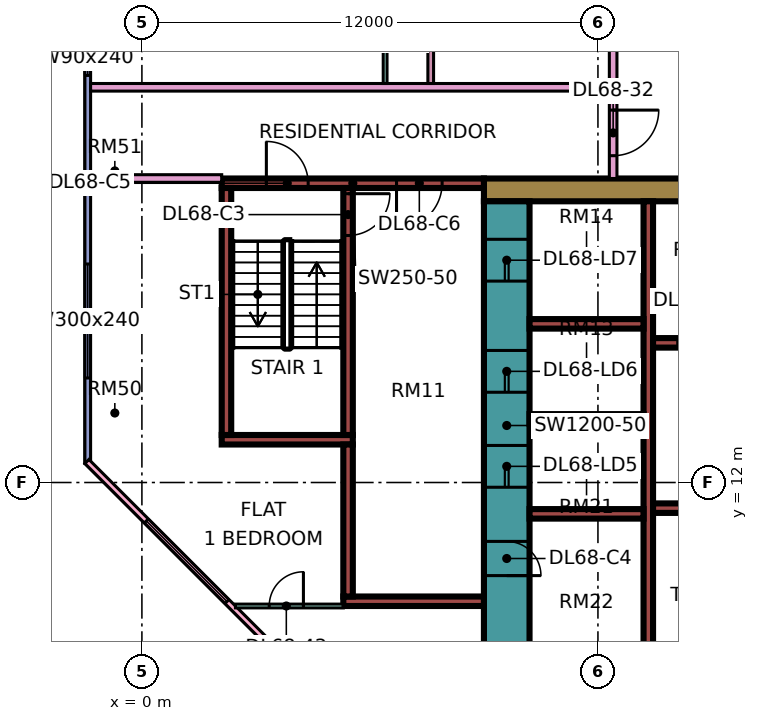
"""IFC4 building model, lengths in metres.
Left out: names, types, materials, properties, quantities, classifications, styles, units other than length and angle.
Written with IfcOpenShell. Run it as: python <this file> out.ifc"""

import sys

from ifc_helpers import new_model, si_unit, direction, frame, frame_2d, origin, place, context, subcontext, project, spatial, rectangle, extrude, element, fill, save


model = new_model("IFC4")
c1 = context("Model", 3, precision=1e-05, world=origin(), true_north=direction((0.0, 1.0)))
c2 = subcontext(c1, "Body", "Model", "MODEL_VIEW")
j1 = project(units=[si_unit("LENGTHUNIT", "METRE"), si_unit("PLANEANGLEUNIT", "RADIAN")], contexts=[c1])
p1 = place(None, origin())
s1 = spatial("IfcSite", under=j1, at=p1, CompositionType="ELEMENT")
p2 = place(p1, origin())
s2 = spatial("IfcBuilding", under=s1, at=p2, CompositionType="ELEMENT")
p3 = place(p2, frame((0.0, 0.0, 292.15)))
s3 = spatial("IfcBuildingStorey", under=s2, at=p3, CompositionType="ELEMENT", Elevation=292.15)
p4 = place(p3, frame((9.0, 19.7, 0.0), z_axis=(0.0, 0.0, 1.0), x_axis=(1.0, 0.0, 0.0)))
e1 = element("IfcWall", 1, at=p4, inside=s3, PredefinedType="SHEAR", context=c2, shape_type="SweptSolid", body=[
    extrude(rectangle(XDim=25.0, YDim=0.6, at=frame_2d((12.5, 0.0))), origin(), (0.0, 0.0, 1.0), 3.75),
])
p5 = place(p4, frame((19.1, 0.0, 0.0)))
e2 = element("IfcOpeningElement", 2, at=p5, cuts=e1, PredefinedType="OPENING", context=c2, shape_type="SweptSolid", body=[
    extrude(rectangle(XDim=1.8, YDim=2.4, at=frame_2d((0.9, 1.2))), frame((0.0, 0.31, 0.0), z_axis=(0.0, -1.0, 0.0), x_axis=(1.0, 0.0, 0.0)), (0.0, 0.0, 1.0), 0.62),
])
p6 = place(p3, frame((9.6, 7.6, 0.0), z_axis=(0.0, 0.0, 1.0), x_axis=(0.0, 1.0, 0.0)))
e3 = element("IfcWall", 3, at=p6, inside=s3, PredefinedType="SHEAR", context=c2, shape_type="SweptSolid", body=[
    extrude(rectangle(XDim=11.8, YDim=1.2, at=frame_2d((5.9, 0.0))), origin(), (0.0, 0.0, 1.0), 3.75),
])
p7 = place(p6, frame((4.275, 0.0, 0.0)))
e4 = element("IfcOpeningElement", 4, at=p7, cuts=e3, PredefinedType="OPENING", context=c2, shape_type="SweptSolid", body=[
    extrude(rectangle(XDim=1.1, YDim=2.2, at=frame_2d((0.55, 1.1))), frame((0.0, 0.61, 0.0), z_axis=(0.0, -1.0, 0.0), x_axis=(1.0, 0.0, 0.0)), (0.0, 0.0, 1.0), 1.22),
])
p8 = place(p6, frame((6.775, 0.0, 0.0)))
e5 = element("IfcOpeningElement", 5, at=p8, cuts=e3, PredefinedType="OPENING", context=c2, shape_type="SweptSolid", body=[
    extrude(rectangle(XDim=1.1, YDim=2.2, at=frame_2d((0.55, 1.1))), frame((0.0, 0.61, 0.0), z_axis=(0.0, -1.0, 0.0), x_axis=(1.0, 0.0, 0.0)), (0.0, 0.0, 1.0), 1.22),
])
p9 = place(p6, frame((9.7, 0.0, 0.0)))
e6 = element("IfcOpeningElement", 6, at=p9, cuts=e3, PredefinedType="OPENING", context=c2, shape_type="SweptSolid", body=[
    extrude(rectangle(XDim=1.1, YDim=2.2, at=frame_2d((0.55, 1.1))), frame((0.0, 0.61, 0.0), z_axis=(0.0, -1.0, 0.0), x_axis=(1.0, 0.0, 0.0)), (0.0, 0.0, 1.0), 1.22),
])
p10 = place(p6, frame((1.95, 0.0, 0.0)))
e7 = element("IfcOpeningElement", 7, at=p10, cuts=e3, PredefinedType="OPENING", context=c2, shape_type="SweptSolid", body=[
    extrude(rectangle(XDim=0.9, YDim=2.1, at=frame_2d((0.45, 1.05))), frame((0.0, 0.61, 0.0), z_axis=(0.0, -1.0, 0.0), x_axis=(1.0, 0.0, 0.0)), (0.0, 0.0, 1.0), 1.22),
])
p11 = place(p3, frame((13.325, 7.6, 0.0), z_axis=(0.0, 0.0, 1.0), x_axis=(0.0, 1.0, 0.0)))
e8 = element("IfcWall", 8, at=p11, inside=s3, PredefinedType="SHEAR", context=c2, shape_type="SweptSolid", body=[
    extrude(rectangle(XDim=11.8, YDim=0.25, at=frame_2d((5.9, 0.0))), origin(), (0.0, 0.0, 1.0), 3.75),
])
p12 = place(p3, frame((13.45, 11.325, 0.0), z_axis=(0.0, 0.0, 1.0), x_axis=(1.0, 0.0, 0.0)))
e9 = element("IfcWall", 9, at=p12, inside=s3, PredefinedType="SHEAR", context=c2, shape_type="SweptSolid", body=[
    extrude(rectangle(XDim=19.95, YDim=0.25, at=frame_2d((9.975, 0.0))), origin(), (0.0, 0.0, 1.0), 3.75),
])
p13 = place(p12, frame((1.55, 0.0, 0.0)))
e10 = element("IfcOpeningElement", 10, at=p13, cuts=e9, PredefinedType="OPENING", context=c2, shape_type="SweptSolid", body=[
    extrude(rectangle(XDim=0.9, YDim=2.1, at=frame_2d((0.45, 1.05))), frame((0.0, 0.135, 0.0), z_axis=(0.0, -1.0, 0.0), x_axis=(1.0, 0.0, 0.0)), (0.0, 0.0, 1.0), 0.27),
])
p14 = place(p12, frame((5.05, 0.0, 0.0)))
e11 = element("IfcOpeningElement", 11, at=p14, cuts=e9, PredefinedType="OPENING", context=c2, shape_type="SweptSolid", body=[
    extrude(rectangle(XDim=0.9, YDim=2.1, at=frame_2d((0.45, 1.05))), frame((0.0, 0.135, 0.0), z_axis=(0.0, -1.0, 0.0), x_axis=(1.0, 0.0, 0.0)), (0.0, 0.0, 1.0), 0.27),
])
p15 = place(p12, frame((8.425, 0.0, 0.0)))
e12 = element("IfcOpeningElement", 12, at=p15, cuts=e9, PredefinedType="OPENING", context=c2, shape_type="SweptSolid", body=[
    extrude(rectangle(XDim=0.9, YDim=2.1, at=frame_2d((0.45, 1.05))), frame((0.0, 0.135, 0.0), z_axis=(0.0, -1.0, 0.0), x_axis=(1.0, 0.0, 0.0)), (0.0, 0.0, 1.0), 0.27),
])
p16 = place(p12, frame((15.025, 0.0, 0.0)))
e13 = element("IfcOpeningElement", 13, at=p16, cuts=e9, PredefinedType="OPENING", context=c2, shape_type="SweptSolid", body=[
    extrude(rectangle(XDim=0.9, YDim=2.1, at=frame_2d((0.45, 1.05))), frame((0.0, 0.135, 0.0), z_axis=(0.0, -1.0, 0.0), x_axis=(1.0, 0.0, 0.0)), (0.0, 0.0, 1.0), 0.27),
])
p17 = place(p3, frame((13.45, 15.675, 0.0), z_axis=(0.0, 0.0, 1.0), x_axis=(1.0, 0.0, 0.0)))
e14 = element("IfcWall", 14, at=p17, inside=s3, PredefinedType="SHEAR", context=c2, shape_type="SweptSolid", body=[
    extrude(rectangle(XDim=13.75, YDim=0.25, at=frame_2d((6.875, 0.0))), origin(), (0.0, 0.0, 1.0), 3.75),
])
p18 = place(p17, frame((0.65, 0.0, 0.0)))
e15 = element("IfcOpeningElement", 15, at=p18, cuts=e14, PredefinedType="OPENING", context=c2, shape_type="SweptSolid", body=[
    extrude(rectangle(XDim=1.2, YDim=2.2, at=frame_2d((0.6, 1.1))), frame((0.0, 0.135, 0.0), z_axis=(0.0, -1.0, 0.0), x_axis=(1.0, 0.0, 0.0)), (0.0, 0.0, 1.0), 0.27),
])
p19 = place(p17, frame((3.4, 0.0, 0.0)))
e16 = element("IfcOpeningElement", 16, at=p19, cuts=e14, PredefinedType="OPENING", context=c2, shape_type="SweptSolid", body=[
    extrude(rectangle(XDim=1.2, YDim=2.2, at=frame_2d((0.6, 1.1))), frame((0.0, 0.135, 0.0), z_axis=(0.0, -1.0, 0.0), x_axis=(1.0, 0.0, 0.0)), (0.0, 0.0, 1.0), 0.27),
])
p20 = place(p17, frame((6.15, 0.0, 0.0)))
e17 = element("IfcOpeningElement", 17, at=p20, cuts=e14, PredefinedType="OPENING", context=c2, shape_type="SweptSolid", body=[
    extrude(rectangle(XDim=1.2, YDim=2.2, at=frame_2d((0.6, 1.1))), frame((0.0, 0.135, 0.0), z_axis=(0.0, -1.0, 0.0), x_axis=(1.0, 0.0, 0.0)), (0.0, 0.0, 1.0), 0.27),
])
p21 = place(p17, frame((8.9, 0.0, 0.0)))
e18 = element("IfcOpeningElement", 18, at=p21, cuts=e14, PredefinedType="OPENING", context=c2, shape_type="SweptSolid", body=[
    extrude(rectangle(XDim=1.2, YDim=2.2, at=frame_2d((0.6, 1.1))), frame((0.0, 0.135, 0.0), z_axis=(0.0, -1.0, 0.0), x_axis=(1.0, 0.0, 0.0)), (0.0, 0.0, 1.0), 0.27),
])
p22 = place(p17, frame((11.8, 0.0, 0.0)))
e19 = element("IfcOpeningElement", 19, at=p22, cuts=e14, PredefinedType="OPENING", context=c2, shape_type="SweptSolid", body=[
    extrude(rectangle(XDim=0.9, YDim=2.1, at=frame_2d((0.45, 1.05))), frame((0.0, 0.135, 0.0), z_axis=(0.0, -1.0, 0.0), x_axis=(1.0, 0.0, 0.0)), (0.0, 0.0, 1.0), 0.27),
])
for number, where, z_axis, x_axis in (
    (20, (10.2, 11.175, 0.0), (0.0, 0.0, 1.0), (1.0, 0.0, 0.0)),
    (21, (10.2, 13.675, 0.0), (0.0, 0.0, 1.0), (1.0, 0.0, 0.0)),
    (22, (10.2, 16.175, 0.0), (0.0, 0.0, 1.0), (1.0, 0.0, 0.0)),
):
    element("IfcWall", number, at=place(p3, frame(where, z_axis=z_axis, x_axis=x_axis)), inside=s3, PredefinedType="SHEAR", context=c2, shape_type="SweptSolid", body=[
        extrude(rectangle(XDim=3.0, YDim=0.25, at=frame_2d((1.5, 0.0))), origin(), (0.0, 0.0, 1.0), 3.75),
    ])
p23 = place(p3, frame((2.1, 19.875, 0.0), z_axis=(0.0, 0.0, 1.0), x_axis=(1.0, 0.0, 0.0)))
e23 = element("IfcWall", 23, at=p23, inside=s3, PredefinedType="SHEAR", context=c2, shape_type="SweptSolid", body=[
    extrude(rectangle(XDim=6.9, YDim=0.25, at=frame_2d((3.45, 0.0))), origin(), (0.0, 0.0, 1.0), 3.75),
])
p24 = place(p23, frame((1.175, 0.0, 0.0)))
e24 = element("IfcOpeningElement", 24, at=p24, cuts=e23, PredefinedType="OPENING", context=c2, shape_type="SweptSolid", body=[
    extrude(rectangle(XDim=1.1, YDim=2.2, at=frame_2d((0.55, 1.1))), frame((0.0, 0.135, 0.0), z_axis=(0.0, -1.0, 0.0), x_axis=(1.0, 0.0, 0.0)), (0.0, 0.0, 1.0), 0.27),
])
p25 = place(p23, frame((4.6, 0.0, 0.0)))
e25 = element("IfcOpeningElement", 25, at=p25, cuts=e23, PredefinedType="OPENING", context=c2, shape_type="SweptSolid", body=[
    extrude(rectangle(XDim=1.2, YDim=2.2, at=frame_2d((0.6, 1.1))), frame((0.0, 0.135, 0.0), z_axis=(0.0, -1.0, 0.0), x_axis=(1.0, 0.0, 0.0)), (0.0, 0.0, 1.0), 0.27),
])
p26 = place(p3, frame((2.1, 13.125, 0.0), z_axis=(0.0, 0.0, 1.0), x_axis=(1.0, 0.0, 0.0)))
e26 = element("IfcWall", 26, at=p26, inside=s3, PredefinedType="SHEAR", context=c2, shape_type="SweptSolid", body=[
    extrude(rectangle(XDim=3.45, YDim=0.25, at=frame_2d((1.725, 0.0))), origin(), (0.0, 0.0, 1.0), 3.75),
])
p27 = place(p3, frame((2.225, 13.25, 0.0), z_axis=(0.0, 0.0, 1.0), x_axis=(0.0, 1.0, 0.0)))
e27 = element("IfcWall", 27, at=p27, inside=s3, PredefinedType="SHEAR", context=c2, shape_type="SweptSolid", body=[
    extrude(rectangle(XDim=6.5, YDim=0.25, at=frame_2d((3.25, 0.0))), origin(), (0.0, 0.0, 1.0), 3.75),
])
p28 = place(p3, frame((5.425, 13.25, 0.0), z_axis=(0.0, 0.0, 1.0), x_axis=(0.0, 1.0, 0.0)))
e28 = element("IfcWall", 28, at=p28, inside=s3, PredefinedType="SHEAR", context=c2, shape_type="SweptSolid", body=[
    extrude(rectangle(XDim=6.5, YDim=0.25, at=frame_2d((3.25, 0.0))), origin(), (0.0, 0.0, 1.0), 3.75),
])
p29 = place(p28, frame((5.25, 0.0, 0.0)))
e29 = element("IfcOpeningElement", 29, at=p29, cuts=e28, PredefinedType="OPENING", context=c2, shape_type="SweptSolid", body=[
    extrude(rectangle(XDim=1.1, YDim=2.2, at=frame_2d((0.55, 1.1))), frame((0.0, 0.135, 0.0), z_axis=(0.0, -1.0, 0.0), x_axis=(1.0, 0.0, 0.0)), (0.0, 0.0, 1.0), 0.27),
])
p30 = place(p3, frame((5.3, 8.875, 0.0), z_axis=(0.0, 0.0, 1.0), x_axis=(1.0, 0.0, 0.0)))
e30 = element("IfcWall", 30, at=p30, inside=s3, PredefinedType="SHEAR", context=c2, shape_type="SweptSolid", body=[
    extrude(rectangle(XDim=3.7, YDim=0.25, at=frame_2d((1.85, 0.0))), origin(), (0.0, 0.0, 1.0), 3.75),
])
p31 = place(p3, frame((5.425, 9.0, 0.0), z_axis=(0.0, 0.0, 1.0), x_axis=(0.0, 1.0, 0.0)))
e31 = element("IfcWall", 31, at=p31, inside=s3, PredefinedType="SHEAR", context=c2, shape_type="SweptSolid", body=[
    extrude(rectangle(XDim=4.0, YDim=0.25, at=frame_2d((2.0, 0.0))), origin(), (0.0, 0.0, 1.0), 3.75),
])
p32 = place(p3, frame((-1.425, 23.925, 0.0), z_axis=(0.0, 0.0, 1.0), x_axis=(0.0, -1.0, 0.0)))
e32 = element("IfcWall", 32, at=p32, inside=s3, PredefinedType="SOLIDWALL", context=c2, shape_type="SweptSolid", body=[
    extrude(rectangle(XDim=11.425, YDim=0.15, at=frame_2d((5.712, 0.0))), origin(), (0.0, 0.0, 1.0), 3.35),
])
p33 = place(p32, frame((0.312, 0.0, 0.45)))
e33 = element("IfcOpeningElement", 33, at=p33, cuts=e32, PredefinedType="OPENING", context=c2, shape_type="SweptSolid", body=[
    extrude(rectangle(XDim=0.9, YDim=2.4, at=frame_2d((0.45, 1.2))), frame((0.0, 0.085, 0.0), z_axis=(0.0, -1.0, 0.0), x_axis=(1.0, 0.0, 0.0)), (0.0, 0.0, 1.0), 0.17),
])
p34 = place(p32, frame((6.175, 0.0, 0.45)))
e34 = element("IfcOpeningElement", 34, at=p34, cuts=e32, PredefinedType="OPENING", context=c2, shape_type="SweptSolid", body=[
    extrude(rectangle(XDim=3.0, YDim=2.4, at=frame_2d((1.5, 1.2))), frame((0.0, 0.085, 0.0), z_axis=(0.0, -1.0, 0.0), x_axis=(1.0, 0.0, 0.0)), (0.0, 0.0, 1.0), 0.17),
])
p35 = place(p3, frame((-1.447, 12.553, 0.0), z_axis=(0.0, 0.0, 1.0), x_axis=(0.707106781187, -0.707106781187, 0.0)))
e35 = element("IfcWall", 35, at=p35, inside=s3, PredefinedType="SOLIDWALL", context=c2, shape_type="SweptSolid", body=[
    extrude(rectangle(XDim=19.799, YDim=0.15, at=frame_2d((9.899, 0.0))), origin(), (0.0, 0.0, 1.0), 3.35),
])
p36 = place(p35, frame((2.212, 0.0, 0.45)))
e36 = element("IfcOpeningElement", 36, at=p36, cuts=e35, PredefinedType="OPENING", context=c2, shape_type="SweptSolid", body=[
    extrude(rectangle(XDim=3.0, YDim=2.4, at=frame_2d((1.5, 1.2))), frame((0.0, 0.085, 0.0), z_axis=(0.0, -1.0, 0.0), x_axis=(1.0, 0.0, 0.0)), (0.0, 0.0, 1.0), 0.17),
])
p37 = place(p35, frame((10.216, 0.0, 0.45)))
e37 = element("IfcOpeningElement", 37, at=p37, cuts=e35, PredefinedType="OPENING", context=c2, shape_type="SweptSolid", body=[
    extrude(rectangle(XDim=3.0, YDim=2.4, at=frame_2d((1.5, 1.2))), frame((0.0, 0.085, 0.0), z_axis=(0.0, -1.0, 0.0), x_axis=(1.0, 0.0, 0.0)), (0.0, 0.0, 1.0), 0.17),
])
p38 = place(p3, frame((-1.35, 20.0, 0.0), z_axis=(0.0, 0.0, 1.0), x_axis=(1.0, 0.0, 0.0)))
e38 = element("IfcWall", 38, at=p38, inside=s3, PredefinedType="PARTITIONING", context=c2, shape_type="SweptSolid", body=[
    extrude(rectangle(XDim=3.45, YDim=0.2, at=frame_2d((1.725, 0.0))), origin(), (0.0, 0.0, 1.0), 3.35),
])
p39 = place(p3, frame((-1.35, 22.4, 0.0), z_axis=(0.0, 0.0, 1.0), x_axis=(1.0, 0.0, 0.0)))
e39 = element("IfcWall", 39, at=p39, inside=s3, PredefinedType="PARTITIONING", context=c2, shape_type="SweptSolid", body=[
    extrude(rectangle(XDim=13.65, YDim=0.2, at=frame_2d((6.825, 0.0))), origin(), (0.0, 0.0, 1.0), 3.35),
])
p40 = place(p3, frame((2.461, 8.75, 0.0), z_axis=(0.0, 0.0, 1.0), x_axis=(1.0, 0.0, 0.0)))
e40 = element("IfcWall", 40, at=p40, inside=s3, PredefinedType="PARTITIONING", context=c2, shape_type="SweptSolid", body=[
    extrude(rectangle(XDim=2.839, YDim=0.1, at=frame_2d((1.419, 0.0))), origin(), (0.0, 0.0, 1.0), 3.35),
])
p41 = place(p40, frame((0.889, 0.0, 0.0)))
e41 = element("IfcOpeningElement", 41, at=p41, cuts=e40, PredefinedType="OPENING", context=c2, shape_type="SweptSolid", body=[
    extrude(rectangle(XDim=0.9, YDim=2.1, at=frame_2d((0.45, 1.05))), frame((0.0, 0.06, 0.0), z_axis=(0.0, -1.0, 0.0), x_axis=(1.0, 0.0, 0.0)), (0.0, 0.0, 1.0), 0.12),
])
p42 = place(p3, frame((6.4, 22.5, 0.0), z_axis=(0.0, 0.0, 1.0), x_axis=(0.0, 1.0, 0.0)))
e42 = element("IfcWall", 42, at=p42, inside=s3, PredefinedType="PARTITIONING", context=c2, shape_type="SweptSolid", body=[
    extrude(rectangle(XDim=4.45, YDim=0.1, at=frame_2d((2.225, 0.0))), origin(), (0.0, 0.0, 1.0), 3.35),
])
p43 = place(p42, frame((1.8, 0.0, 0.0)))
e43 = element("IfcOpeningElement", 43, at=p43, cuts=e42, PredefinedType="OPENING", context=c2, shape_type="SweptSolid", body=[
    extrude(rectangle(XDim=0.9, YDim=2.1, at=frame_2d((0.45, 1.05))), frame((0.0, 0.06, 0.0), z_axis=(0.0, -1.0, 0.0), x_axis=(1.0, 0.0, 0.0)), (0.0, 0.0, 1.0), 0.12),
])
p44 = place(p3, frame((7.6, 22.5, 0.0), z_axis=(0.0, 0.0, 1.0), x_axis=(0.0, 1.0, 0.0)))
e44 = element("IfcWall", 44, at=p44, inside=s3, PredefinedType="PARTITIONING", context=c2, shape_type="SweptSolid", body=[
    extrude(rectangle(XDim=10.275, YDim=0.15, at=frame_2d((5.137, 0.0))), origin(), (0.0, 0.0, 1.0), 3.35),
])
p45 = place(p44, frame((8.7, 0.0, 0.0)))
e45 = element("IfcOpeningElement", 45, at=p45, cuts=e44, PredefinedType="OPENING", context=c2, shape_type="SweptSolid", body=[
    extrude(rectangle(XDim=0.8, YDim=2.1, at=frame_2d((0.4, 1.05))), frame((0.0, 0.085, 0.0), z_axis=(0.0, -1.0, 0.0), x_axis=(1.0, 0.0, 0.0)), (0.0, 0.0, 1.0), 0.17),
])
p46 = place(p44, frame((3.5, 0.0, 0.0)))
e46 = element("IfcOpeningElement", 46, at=p46, cuts=e44, PredefinedType="OPENING", context=c2, shape_type="SweptSolid", body=[
    extrude(rectangle(XDim=0.9, YDim=2.1, at=frame_2d((0.45, 1.05))), frame((0.0, 0.085, 0.0), z_axis=(0.0, -1.0, 0.0), x_axis=(1.0, 0.0, 0.0)), (0.0, 0.0, 1.0), 0.17),
])
p47 = place(p3, frame((12.4, 20.0, 0.0), z_axis=(0.0, 0.0, 1.0), x_axis=(0.0, 1.0, 0.0)))
e47 = element("IfcWall", 47, at=p47, inside=s3, PredefinedType="PARTITIONING", context=c2, shape_type="SweptSolid", body=[
    extrude(rectangle(XDim=34.0, YDim=0.2, at=frame_2d((17.0, 0.0))), origin(), (0.0, 0.0, 1.0), 3.35),
])
p48 = place(p47, frame((31.95, 0.0, 0.0)))
e48 = element("IfcOpeningElement", 48, at=p48, cuts=e47, PredefinedType="OPENING", context=c2, shape_type="SweptSolid", body=[
    extrude(rectangle(XDim=1.0, YDim=2.1, at=frame_2d((0.5, 1.05))), frame((0.0, 0.11, 0.0), z_axis=(0.0, -1.0, 0.0), x_axis=(1.0, 0.0, 0.0)), (0.0, 0.0, 1.0), 0.22),
])
p49 = place(p47, frame((0.6, 0.0, 0.0)))
e49 = element("IfcOpeningElement", 49, at=p49, cuts=e47, PredefinedType="OPENING", context=c2, shape_type="SweptSolid", body=[
    extrude(rectangle(XDim=1.2, YDim=2.1, at=frame_2d((0.6, 1.05))), frame((0.0, 0.11, 0.0), z_axis=(0.0, -1.0, 0.0), x_axis=(1.0, 0.0, 0.0)), (0.0, 0.0, 1.0), 0.22),
])
p50 = place(p47, frame((13.8, 0.0, 0.0)))
e50 = element("IfcOpeningElement", 50, at=p50, cuts=e47, PredefinedType="OPENING", context=c2, shape_type="SweptSolid", body=[
    extrude(rectangle(XDim=1.0, YDim=2.1, at=frame_2d((0.5, 1.05))), frame((0.0, 0.11, 0.0), z_axis=(0.0, -1.0, 0.0), x_axis=(1.0, 0.0, 0.0)), (0.0, 0.0, 1.0), 0.22),
])
p51 = place(p33, origin())
e51 = element("IfcWindow", 51, at=p51, inside=s3, PartitioningType="SINGLE_PANEL", PredefinedType="WINDOW", context=c2, shape_type="SweptSolid", body=[
    extrude(rectangle(XDim=0.9, YDim=2.4, at=frame_2d((0.45, 1.2))), frame((0.0, 0.03, 0.0), z_axis=(0.0, -1.0, 0.0), x_axis=(1.0, 0.0, 0.0)), (0.0, 0.0, 1.0), 0.06),
])
fill(e33, e51)
p52 = place(p34, origin())
e52 = element("IfcWindow", 52, at=p52, inside=s3, PartitioningType="SINGLE_PANEL", PredefinedType="WINDOW", context=c2, shape_type="SweptSolid", body=[
    extrude(rectangle(XDim=3.0, YDim=2.4, at=frame_2d((1.5, 1.2))), frame((0.0, 0.03, 0.0), z_axis=(0.0, -1.0, 0.0), x_axis=(1.0, 0.0, 0.0)), (0.0, 0.0, 1.0), 0.06),
])
fill(e34, e52)
p53 = place(p36, origin())
e53 = element("IfcWindow", 53, at=p53, inside=s3, PartitioningType="SINGLE_PANEL", PredefinedType="WINDOW", context=c2, shape_type="SweptSolid", body=[
    extrude(rectangle(XDim=3.0, YDim=2.4, at=frame_2d((1.5, 1.2))), frame((0.0, 0.03, 0.0), z_axis=(0.0, -1.0, 0.0), x_axis=(1.0, 0.0, 0.0)), (0.0, 0.0, 1.0), 0.06),
])
fill(e36, e53)
p54 = place(p18, origin())
e54 = element("IfcDoor", 54, at=p54, inside=s3, OperationType="DOUBLE_DOOR_SLIDING", PredefinedType="DOOR", context=c2, shape_type="SweptSolid", body=[
    extrude(rectangle(XDim=1.2, YDim=2.2, at=frame_2d((0.6, 1.1))), frame((0.0, 0.025, 0.0), z_axis=(0.0, -1.0, 0.0), x_axis=(1.0, 0.0, 0.0)), (0.0, 0.0, 1.0), 0.05),
])
fill(e15, e54)
p55 = place(p7, origin())
e55 = element("IfcDoor", 55, at=p55, inside=s3, OperationType="DOUBLE_DOOR_SLIDING", PredefinedType="DOOR", context=c2, shape_type="SweptSolid", body=[
    extrude(rectangle(XDim=1.1, YDim=2.2, at=frame_2d((0.55, 1.1))), frame((0.0, 0.025, 0.0), z_axis=(0.0, -1.0, 0.0), x_axis=(1.0, 0.0, 0.0)), (0.0, 0.0, 1.0), 0.05),
])
fill(e4, e55)
p56 = place(p8, origin())
e56 = element("IfcDoor", 56, at=p56, inside=s3, OperationType="DOUBLE_DOOR_SLIDING", PredefinedType="DOOR", context=c2, shape_type="SweptSolid", body=[
    extrude(rectangle(XDim=1.1, YDim=2.2, at=frame_2d((0.55, 1.1))), frame((0.0, 0.025, 0.0), z_axis=(0.0, -1.0, 0.0), x_axis=(1.0, 0.0, 0.0)), (0.0, 0.0, 1.0), 0.05),
])
fill(e5, e56)
p57 = place(p9, origin())
e57 = element("IfcDoor", 57, at=p57, inside=s3, OperationType="DOUBLE_DOOR_SLIDING", PredefinedType="DOOR", context=c2, shape_type="SweptSolid", body=[
    extrude(rectangle(XDim=1.1, YDim=2.2, at=frame_2d((0.55, 1.1))), frame((0.0, 0.025, 0.0), z_axis=(0.0, -1.0, 0.0), x_axis=(1.0, 0.0, 0.0)), (0.0, 0.0, 1.0), 0.05),
])
fill(e6, e57)
p58 = place(p29, origin())
e58 = element("IfcDoor", 58, at=p58, inside=s3, OperationType="SINGLE_SWING_RIGHT", PredefinedType="DOOR", context=c2, shape_type="SweptSolid", body=[
    extrude(rectangle(XDim=1.1, YDim=2.2, at=frame_2d((0.55, 1.1))), frame((0.0, 0.025, 0.0), z_axis=(0.0, -1.0, 0.0), x_axis=(1.0, 0.0, 0.0)), (0.0, 0.0, 1.0), 0.05),
])
fill(e29, e58)
p59 = place(p10, frame((0.9, 0.0, 0.0), z_axis=(0.0, 0.0, 1.0), x_axis=(-1.0, 0.0, 0.0)))
e59 = element("IfcDoor", 59, at=p59, inside=s3, OperationType="SINGLE_SWING_LEFT", PredefinedType="DOOR", context=c2, shape_type="SweptSolid", body=[
    extrude(rectangle(XDim=0.9, YDim=2.1, at=frame_2d((0.45, 1.05))), frame((0.0, 0.025, 0.0), z_axis=(0.0, -1.0, 0.0), x_axis=(1.0, 0.0, 0.0)), (0.0, 0.0, 1.0), 0.05),
])
fill(e7, e59)
p60 = place(p24, origin())
e60 = element("IfcDoor", 60, at=p60, inside=s3, OperationType="SINGLE_SWING_LEFT", PredefinedType="DOOR", context=c2, shape_type="SweptSolid", body=[
    extrude(rectangle(XDim=1.1, YDim=2.2, at=frame_2d((0.55, 1.1))), frame((0.0, 0.025, 0.0), z_axis=(0.0, -1.0, 0.0), x_axis=(1.0, 0.0, 0.0)), (0.0, 0.0, 1.0), 0.05),
])
fill(e24, e60)
p61 = place(p25, frame((1.2, 0.0, 0.0), z_axis=(0.0, 0.0, 1.0), x_axis=(-1.0, 0.0, 0.0)))
e61 = element("IfcDoor", 61, at=p61, inside=s3, OperationType="SINGLE_SWING_LEFT", PredefinedType="DOOR", context=c2, shape_type="SweptSolid", body=[
    extrude(rectangle(XDim=1.2, YDim=2.2, at=frame_2d((0.6, 1.1))), frame((0.0, 0.025, 0.0), z_axis=(0.0, -1.0, 0.0), x_axis=(1.0, 0.0, 0.0)), (0.0, 0.0, 1.0), 0.05),
])
fill(e25, e61)
p62 = place(p49, origin())
e62 = element("IfcDoor", 62, at=p62, inside=s3, OperationType="SINGLE_SWING_RIGHT", PredefinedType="DOOR", context=c2, shape_type="SweptSolid", body=[
    extrude(rectangle(XDim=1.2, YDim=2.1, at=frame_2d((0.6, 1.05))), frame((0.0, 0.025, 0.0), z_axis=(0.0, -1.0, 0.0), x_axis=(1.0, 0.0, 0.0)), (0.0, 0.0, 1.0), 0.05),
])
fill(e49, e62)
p63 = place(p41, frame((0.9, 0.0, 0.0), z_axis=(0.0, 0.0, 1.0), x_axis=(-1.0, 0.0, 0.0)))
e63 = element("IfcDoor", 63, at=p63, inside=s3, OperationType="SINGLE_SWING_RIGHT", PredefinedType="DOOR", context=c2, shape_type="SweptSolid", body=[
    extrude(rectangle(XDim=0.9, YDim=2.1, at=frame_2d((0.45, 1.05))), frame((0.0, 0.025, 0.0), z_axis=(0.0, -1.0, 0.0), x_axis=(1.0, 0.0, 0.0)), (0.0, 0.0, 1.0), 0.05),
])
fill(e41, e63)
save(model, sys.argv[1])
